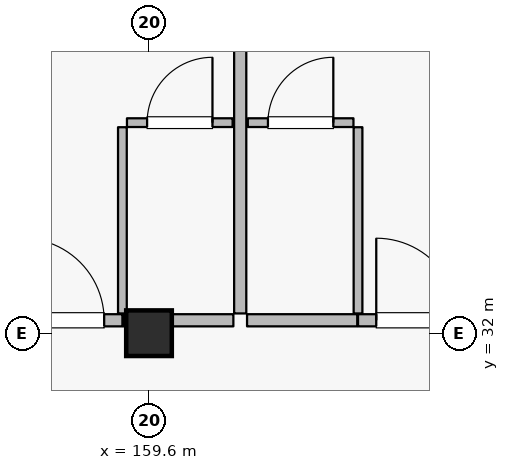
"""IFC4 building model, lengths in metres.
Left out: names, types, materials, properties, quantities, classifications, styles, units other than length and angle.
Written with IfcOpenShell. Run it as: python <this file> out.ifc"""

import sys

from ifc_helpers import new_model, si_unit, direction, frame, frame_2d, origin, origin_2d, place, context, subcontext, project, spatial, rectangle, extrude, element, fill, save


model = new_model("IFC4")
c1 = context("Model", 3, precision=1e-05, world=origin(), true_north=direction((0.0, 1.0)))
c2 = subcontext(c1, "Body", "Model", "MODEL_VIEW")
j1 = project(units=[si_unit("LENGTHUNIT", "METRE"), si_unit("PLANEANGLEUNIT", "RADIAN")], contexts=[c1])
p1 = place(None, origin())
s1 = spatial("IfcSite", under=j1, at=p1, CompositionType="ELEMENT")
p2 = place(p1, origin())
s2 = spatial("IfcBuilding", under=s1, at=p2, CompositionType="ELEMENT")
p3 = place(p2, frame((0.0, 0.0, 39.6)))
s3 = spatial("IfcBuildingStorey", under=s2, at=p3, CompositionType="ELEMENT", Elevation=39.6)
p4 = place(p3, frame((159.6, 32.0, 0.0), z_axis=(0.0, 0.0, 1.0), x_axis=(1.0, 0.0, 0.0)))
e1 = element("IfcColumn", 1, at=p4, inside=s3, PredefinedType="COLUMN", context=c2, shape_type="SweptSolid", body=[
    extrude(rectangle(XDim=0.6, YDim=0.6, at=origin_2d()), origin(), (0.0, 0.0, 1.0), 3.6),
])
p5 = place(p3, frame((157.69, 32.17, 0.0), z_axis=(0.0, 0.0, 1.0), x_axis=(1.0, 0.0, 0.0)))
e2 = element("IfcWall", 2, at=p5, inside=s3, PredefinedType="PARTITIONING", context=c2, shape_type="SweptSolid", body=[
    extrude(rectangle(XDim=1.56, YDim=0.16, at=frame_2d((0.78, 0.0))), origin(), (0.0, 0.0, 1.0), 2.84),
])
p6 = place(p5, frame((0.24, 0.0, 0.0)))
e3 = element("IfcOpeningElement", 3, at=p6, cuts=e2, PredefinedType="OPENING", context=c2, shape_type="SweptSolid", body=[
    extrude(rectangle(XDim=1.08, YDim=2.3, at=frame_2d((0.54, 1.15))), frame((0.0, 0.09, 0.0), z_axis=(0.0, -1.0, 0.0), x_axis=(1.0, 0.0, 0.0)), (0.0, 0.0, 1.0), 0.18),
])
p7 = place(p3, frame((159.26, 32.17, 0.0), z_axis=(0.0, 0.0, 1.0), x_axis=(1.0, 0.0, 0.0)))
e4 = element("IfcWall", 4, at=p7, inside=s3, PredefinedType="PARTITIONING", context=c2, shape_type="SweptSolid", body=[
    extrude(rectangle(XDim=1.45, YDim=0.16, at=frame_2d((0.725, 0.0))), origin(), (0.0, 0.0, 1.0), 3.335),
])
p8 = place(p3, frame((159.25, 32.26, 0.0), z_axis=(0.0, 0.0, 1.0), x_axis=(0.0, 1.0, 0.0)))
e5 = element("IfcWall", 5, at=p8, inside=s3, PredefinedType="PARTITIONING", context=c2, shape_type="SweptSolid", body=[
    extrude(rectangle(XDim=2.45, YDim=0.115, at=frame_2d((1.225, 0.0))), origin(), (0.0, 0.0, 1.0), 3.335),
])
p9 = place(p3, frame((159.31, 34.77, 0.0), z_axis=(0.0, 0.0, 1.0), x_axis=(1.0, 0.0, 0.0)))
e6 = element("IfcWall", 6, at=p9, inside=s3, PredefinedType="PARTITIONING", context=c2, shape_type="SweptSolid", body=[
    extrude(rectangle(XDim=1.39, YDim=0.115, at=frame_2d((0.695, 0.0))), origin(), (0.0, 0.0, 1.0), 3.335),
])
p10 = place(p9, frame((0.265, 0.0, 0.0)))
e7 = element("IfcOpeningElement", 7, at=p10, cuts=e6, PredefinedType="OPENING", context=c2, shape_type="SweptSolid", body=[
    extrude(rectangle(XDim=0.86, YDim=2.12, at=frame_2d((0.43, 1.06))), frame((0.0, 0.067, 0.0), z_axis=(0.0, -1.0, 0.0), x_axis=(1.0, 0.0, 0.0)), (0.0, 0.0, 1.0), 0.135),
])
p11 = place(p3, frame((160.89, 32.17, 0.0), z_axis=(0.0, 0.0, 1.0), x_axis=(1.0, 0.0, 0.0)))
e8 = element("IfcWall", 8, at=p11, inside=s3, PredefinedType="PARTITIONING", context=c2, shape_type="SweptSolid", body=[
    extrude(rectangle(XDim=1.45, YDim=0.16, at=frame_2d((0.725, 0.0))), origin(), (0.0, 0.0, 1.0), 3.335),
])
p12 = place(p3, frame((162.35, 32.17, 0.0), z_axis=(0.0, 0.0, 1.0), x_axis=(1.0, 0.0, 0.0)))
e9 = element("IfcWall", 9, at=p12, inside=s3, PredefinedType="PARTITIONING", context=c2, shape_type="SweptSolid", body=[
    extrude(rectangle(XDim=1.56, YDim=0.16, at=frame_2d((0.78, 0.0))), origin(), (0.0, 0.0, 1.0), 3.335),
])
p13 = place(p12, frame((0.24, 0.0, 0.0)))
e10 = element("IfcOpeningElement", 10, at=p13, cuts=e9, PredefinedType="OPENING", context=c2, shape_type="SweptSolid", body=[
    extrude(rectangle(XDim=1.08, YDim=2.3, at=frame_2d((0.54, 1.15))), frame((0.0, 0.09, 0.0), z_axis=(0.0, -1.0, 0.0), x_axis=(1.0, 0.0, 0.0)), (0.0, 0.0, 1.0), 0.18),
])
p14 = place(p3, frame((162.35, 32.26, 0.0), z_axis=(0.0, 0.0, 1.0), x_axis=(0.0, 1.0, 0.0)))
e11 = element("IfcWall", 11, at=p14, inside=s3, PredefinedType="PARTITIONING", context=c2, shape_type="SweptSolid", body=[
    extrude(rectangle(XDim=2.45, YDim=0.115, at=frame_2d((1.225, 0.0))), origin(), (0.0, 0.0, 1.0), 3.335),
])
p15 = place(p3, frame((160.9, 34.77, 0.0), z_axis=(0.0, 0.0, 1.0), x_axis=(1.0, 0.0, 0.0)))
e12 = element("IfcWall", 12, at=p15, inside=s3, PredefinedType="PARTITIONING", context=c2, shape_type="SweptSolid", body=[
    extrude(rectangle(XDim=1.39, YDim=0.115, at=frame_2d((0.695, 0.0))), origin(), (0.0, 0.0, 1.0), 3.335),
])
p16 = place(p15, frame((0.265, 0.0, 0.0)))
e13 = element("IfcOpeningElement", 13, at=p16, cuts=e12, PredefinedType="OPENING", context=c2, shape_type="SweptSolid", body=[
    extrude(rectangle(XDim=0.86, YDim=2.12, at=frame_2d((0.43, 1.06))), frame((0.0, 0.067, 0.0), z_axis=(0.0, -1.0, 0.0), x_axis=(1.0, 0.0, 0.0)), (0.0, 0.0, 1.0), 0.135),
])
p17 = place(p3, frame((160.8, 32.26, 0.0), z_axis=(0.0, 0.0, 1.0), x_axis=(0.0, 1.0, 0.0)))
e14 = element("IfcWall", 14, at=p17, inside=s3, PredefinedType="PARTITIONING", context=c2, shape_type="SweptSolid", body=[
    extrude(rectangle(XDim=8.54, YDim=0.16, at=frame_2d((4.27, 0.0))), origin(), (0.0, 0.0, 1.0), 3.335),
])
p18 = place(p6, origin())
e15 = element("IfcDoor", 15, at=p18, inside=s3, OperationType="SINGLE_SWING_LEFT", PredefinedType="DOOR", context=c2, shape_type="SweptSolid", body=[
    extrude(rectangle(XDim=1.08, YDim=2.3, at=frame_2d((0.54, 1.15))), frame((0.0, 0.025, 0.0), z_axis=(0.0, -1.0, 0.0), x_axis=(1.0, 0.0, 0.0)), (0.0, 0.0, 1.0), 0.05),
])
fill(e3, e15)
p19 = place(p10, origin())
e16 = element("IfcDoor", 16, at=p19, inside=s3, OperationType="SINGLE_SWING_RIGHT", PredefinedType="DOOR", context=c2, shape_type="SweptSolid", body=[
    extrude(rectangle(XDim=0.86, YDim=2.12, at=frame_2d((0.43, 1.06))), frame((0.0, 0.025, 0.0), z_axis=(0.0, -1.0, 0.0), x_axis=(1.0, 0.0, 0.0)), (0.0, 0.0, 1.0), 0.05),
])
fill(e7, e16)
p20 = place(p13, origin())
e17 = element("IfcDoor", 17, at=p20, inside=s3, OperationType="SINGLE_SWING_LEFT", PredefinedType="DOOR", context=c2, shape_type="SweptSolid", body=[
    extrude(rectangle(XDim=1.08, YDim=2.3, at=frame_2d((0.54, 1.15))), frame((0.0, 0.025, 0.0), z_axis=(0.0, -1.0, 0.0), x_axis=(1.0, 0.0, 0.0)), (0.0, 0.0, 1.0), 0.05),
])
fill(e10, e17)
p21 = place(p16, origin())
e18 = element("IfcDoor", 18, at=p21, inside=s3, OperationType="SINGLE_SWING_RIGHT", PredefinedType="DOOR", context=c2, shape_type="SweptSolid", body=[
    extrude(rectangle(XDim=0.86, YDim=2.12, at=frame_2d((0.43, 1.06))), frame((0.0, 0.025, 0.0), z_axis=(0.0, -1.0, 0.0), x_axis=(1.0, 0.0, 0.0)), (0.0, 0.0, 1.0), 0.05),
])
fill(e13, e18)
save(model, sys.argv[1])
